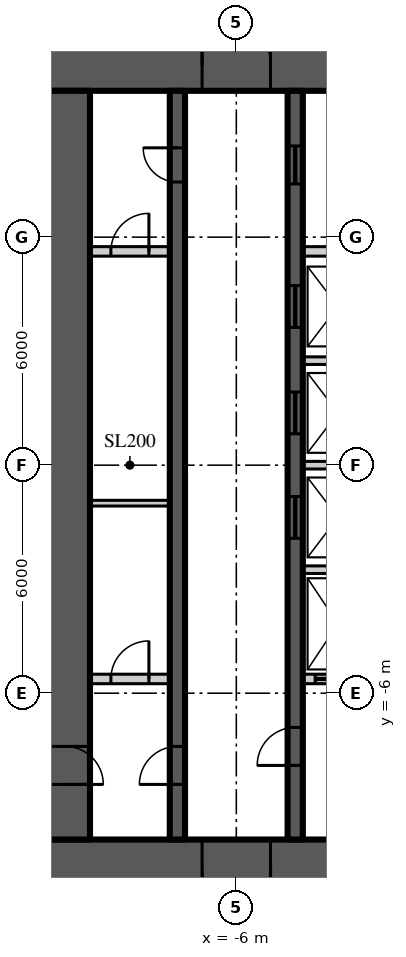
"""IFC4 building model, lengths in metres.
Left out: names, types, materials, properties, quantities, classifications, styles, units other than length and angle.
Written with IfcOpenShell. Run it as: python <this file> out.ifc"""

import sys

from ifc_helpers import new_model, si_unit, direction, frame, frame_2d, origin, place, context, subcontext, project, spatial, rectangle, extrude, element, fill, save


model = new_model("IFC4")
c1 = context("Model", 3, precision=1e-05, world=origin(), true_north=direction((0.0, 1.0)))
c2 = subcontext(c1, "Body", "Model", "MODEL_VIEW")
j1 = project(units=[si_unit("LENGTHUNIT", "METRE"), si_unit("PLANEANGLEUNIT", "RADIAN")], contexts=[c1])
p1 = place(None, origin())
s1 = spatial("IfcSite", under=j1, at=p1, CompositionType="ELEMENT")
p2 = place(p1, origin())
s2 = spatial("IfcBuilding", under=s1, at=p2, CompositionType="ELEMENT")
p3 = place(p2, frame((0.0, 0.0, 143.7)))
s3 = spatial("IfcBuildingStorey", under=s2, at=p3, CompositionType="ELEMENT", Elevation=143.7)
p4 = place(p3, frame((-11.15, 10.5, 0.0), z_axis=(0.0, 0.0, 1.0), x_axis=(1.0, 0.0, 0.0)))
e1 = element("IfcWall", 1, at=p4, inside=s3, PredefinedType="SHEAR", context=c2, shape_type="SweptSolid", body=[
    extrude(rectangle(XDim=22.3, YDim=1.3, at=frame_2d((11.15, 0.0))), origin(), (0.0, 0.0, 1.0), 3.9),
])
p5 = place(p4, frame((4.25, 0.0, 0.0)))
e2 = element("IfcOpeningElement", 2, at=p5, cuts=e1, PredefinedType="OPENING", context=c2, shape_type="SweptSolid", body=[
    extrude(rectangle(XDim=1.8, YDim=2.2, at=frame_2d((0.9, 1.1))), frame((0.0, 0.66, 0.0), z_axis=(0.0, -1.0, 0.0), x_axis=(1.0, 0.0, 0.0)), (0.0, 0.0, 1.0), 1.32),
])
p6 = place(p4, frame((16.25, 0.0, 0.0)))
e3 = element("IfcOpeningElement", 3, at=p6, cuts=e1, PredefinedType="OPENING", context=c2, shape_type="SweptSolid", body=[
    extrude(rectangle(XDim=1.8, YDim=2.2, at=frame_2d((0.9, 1.1))), frame((0.0, 0.66, 0.0), z_axis=(0.0, -1.0, 0.0), x_axis=(1.0, 0.0, 0.0)), (0.0, 0.0, 1.0), 1.32),
])
p7 = place(p3, frame((11.15, -10.5, 0.0), z_axis=(0.0, 0.0, 1.0), x_axis=(-1.0, 0.0, 0.0)))
e4 = element("IfcWall", 4, at=p7, inside=s3, PredefinedType="SHEAR", context=c2, shape_type="SweptSolid", body=[
    extrude(rectangle(XDim=22.3, YDim=1.3, at=frame_2d((11.15, 0.0))), origin(), (0.0, 0.0, 1.0), 3.9),
])
p8 = place(p7, frame((16.25, 0.0, 0.0)))
e5 = element("IfcOpeningElement", 5, at=p8, cuts=e4, PredefinedType="OPENING", context=c2, shape_type="SweptSolid", body=[
    extrude(rectangle(XDim=1.8, YDim=2.2, at=frame_2d((0.9, 1.1))), frame((0.0, 0.66, 0.0), z_axis=(0.0, -1.0, 0.0), x_axis=(1.0, 0.0, 0.0)), (0.0, 0.0, 1.0), 1.32),
])
p9 = place(p7, frame((4.25, 0.0, 0.0)))
e6 = element("IfcOpeningElement", 6, at=p9, cuts=e4, PredefinedType="OPENING", context=c2, shape_type="SweptSolid", body=[
    extrude(rectangle(XDim=1.8, YDim=2.2, at=frame_2d((0.9, 1.1))), frame((0.0, 0.66, 0.0), z_axis=(0.0, -1.0, 0.0), x_axis=(1.0, 0.0, 0.0)), (0.0, 0.0, 1.0), 1.32),
])
p10 = place(p3, frame((-10.5, 9.85, 0.0), z_axis=(0.0, 0.0, 1.0), x_axis=(0.0, -1.0, 0.0)))
e7 = element("IfcWall", 7, at=p10, inside=s3, PredefinedType="SHEAR", context=c2, shape_type="SweptSolid", body=[
    extrude(rectangle(XDim=19.7, YDim=1.3, at=frame_2d((9.85, 0.0))), origin(), (0.0, 0.0, 1.0), 3.9),
])
p11 = place(p10, frame((17.25, 0.0, 0.0)))
e8 = element("IfcOpeningElement", 8, at=p11, cuts=e7, PredefinedType="OPENING", context=c2, shape_type="SweptSolid", body=[
    extrude(rectangle(XDim=1.0, YDim=2.2, at=frame_2d((0.5, 1.1))), frame((0.0, 0.66, 0.0), z_axis=(0.0, -1.0, 0.0), x_axis=(1.0, 0.0, 0.0)), (0.0, 0.0, 1.0), 1.32),
])
p12 = place(p3, frame((-7.55, -9.85, 0.0), z_axis=(0.0, 0.0, 1.0), x_axis=(0.0, 1.0, 0.0)))
e9 = element("IfcWall", 9, at=p12, inside=s3, PredefinedType="SHEAR", context=c2, shape_type="SweptSolid", body=[
    extrude(rectangle(XDim=19.7, YDim=0.4, at=frame_2d((9.85, 0.0))), origin(), (0.0, 0.0, 1.0), 3.9),
])
p13 = place(p12, frame((1.45, 0.0, 0.0)))
e10 = element("IfcOpeningElement", 10, at=p13, cuts=e9, PredefinedType="OPENING", context=c2, shape_type="SweptSolid", body=[
    extrude(rectangle(XDim=1.0, YDim=2.2, at=frame_2d((0.5, 1.1))), frame((0.0, 0.21, 0.0), z_axis=(0.0, -1.0, 0.0), x_axis=(1.0, 0.0, 0.0)), (0.0, 0.0, 1.0), 0.42),
])
p14 = place(p12, frame((17.3, 0.0, 0.0)))
e11 = element("IfcOpeningElement", 11, at=p14, cuts=e9, PredefinedType="OPENING", context=c2, shape_type="SweptSolid", body=[
    extrude(rectangle(XDim=0.9, YDim=2.1, at=frame_2d((0.45, 1.05))), frame((0.0, 0.21, 0.0), z_axis=(0.0, -1.0, 0.0), x_axis=(1.0, 0.0, 0.0)), (0.0, 0.0, 1.0), 0.42),
])
p15 = place(p3, frame((-4.45, -9.85, 0.0), z_axis=(0.0, 0.0, 1.0), x_axis=(0.0, 1.0, 0.0)))
e12 = element("IfcWall", 12, at=p15, inside=s3, PredefinedType="SHEAR", context=c2, shape_type="SweptSolid", body=[
    extrude(rectangle(XDim=19.7, YDim=0.4, at=frame_2d((9.85, 0.0))), origin(), (0.0, 0.0, 1.0), 3.9),
])
p16 = place(p15, frame((1.95, 0.0, 0.0)))
e13 = element("IfcOpeningElement", 13, at=p16, cuts=e12, PredefinedType="OPENING", context=c2, shape_type="SweptSolid", body=[
    extrude(rectangle(XDim=1.0, YDim=2.2, at=frame_2d((0.5, 1.1))), frame((0.0, 0.21, 0.0), z_axis=(0.0, -1.0, 0.0), x_axis=(1.0, 0.0, 0.0)), (0.0, 0.0, 1.0), 0.42),
])
p17 = place(p15, frame((17.25, 0.0, 0.0)))
e14 = element("IfcOpeningElement", 14, at=p17, cuts=e12, PredefinedType="OPENING", context=c2, shape_type="SweptSolid", body=[
    extrude(rectangle(XDim=1.0, YDim=2.1, at=frame_2d((0.5, 1.05))), frame((0.0, 0.21, 0.0), z_axis=(0.0, -1.0, 0.0), x_axis=(1.0, 0.0, 0.0)), (0.0, 0.0, 1.0), 0.42),
])
p18 = place(p15, frame((7.925, 0.0, 0.0)))
e15 = element("IfcOpeningElement", 15, at=p18, cuts=e12, PredefinedType="OPENING", context=c2, shape_type="SweptSolid", body=[
    extrude(rectangle(XDim=1.1, YDim=2.2, at=frame_2d((0.55, 1.1))), frame((0.0, 0.21, 0.0), z_axis=(0.0, -1.0, 0.0), x_axis=(1.0, 0.0, 0.0)), (0.0, 0.0, 1.0), 0.42),
])
p19 = place(p15, frame((10.675, 0.0, 0.0)))
e16 = element("IfcOpeningElement", 16, at=p19, cuts=e12, PredefinedType="OPENING", context=c2, shape_type="SweptSolid", body=[
    extrude(rectangle(XDim=1.1, YDim=2.2, at=frame_2d((0.55, 1.1))), frame((0.0, 0.21, 0.0), z_axis=(0.0, -1.0, 0.0), x_axis=(1.0, 0.0, 0.0)), (0.0, 0.0, 1.0), 0.42),
])
p20 = place(p15, frame((13.475, 0.0, 0.0)))
e17 = element("IfcOpeningElement", 17, at=p20, cuts=e12, PredefinedType="OPENING", context=c2, shape_type="SweptSolid", body=[
    extrude(rectangle(XDim=1.1, YDim=2.2, at=frame_2d((0.55, 1.1))), frame((0.0, 0.21, 0.0), z_axis=(0.0, -1.0, 0.0), x_axis=(1.0, 0.0, 0.0)), (0.0, 0.0, 1.0), 0.42),
])
p21 = place(p3, frame((-9.85, 5.625, 0.0), z_axis=(0.0, 0.0, 1.0), x_axis=(1.0, 0.0, 0.0)))
e18 = element("IfcWall", 18, at=p21, inside=s3, PredefinedType="SOLIDWALL", context=c2, shape_type="SweptSolid", body=[
    extrude(rectangle(XDim=2.1, YDim=0.25, at=frame_2d((1.05, 0.0))), origin(), (0.0, 0.0, 1.0), 3.7),
])
p22 = place(p21, frame((0.55, 0.0, 0.0)))
e19 = element("IfcOpeningElement", 19, at=p22, cuts=e18, PredefinedType="OPENING", context=c2, shape_type="SweptSolid", body=[
    extrude(rectangle(XDim=1.0, YDim=2.2, at=frame_2d((0.5, 1.1))), frame((0.0, 0.135, 0.0), z_axis=(0.0, -1.0, 0.0), x_axis=(1.0, 0.0, 0.0)), (0.0, 0.0, 1.0), 0.27),
])
p23 = place(p3, frame((-4.25, 5.625, 0.0), z_axis=(0.0, 0.0, 1.0), x_axis=(1.0, 0.0, 0.0)))
e20 = element("IfcWall", 20, at=p23, inside=s3, PredefinedType="SOLIDWALL", context=c2, shape_type="SweptSolid", body=[
    extrude(rectangle(XDim=1.85, YDim=0.25, at=frame_2d((0.925, 0.0))), origin(), (0.0, 0.0, 1.0), 3.7),
])
p24 = place(p3, frame((-9.85, -5.625, 0.0), z_axis=(0.0, 0.0, 1.0), x_axis=(1.0, 0.0, 0.0)))
e21 = element("IfcWall", 21, at=p24, inside=s3, PredefinedType="SOLIDWALL", context=c2, shape_type="SweptSolid", body=[
    extrude(rectangle(XDim=2.1, YDim=0.25, at=frame_2d((1.05, 0.0))), origin(), (0.0, 0.0, 1.0), 3.7),
])
p25 = place(p24, frame((0.55, 0.0, 0.0)))
e22 = element("IfcOpeningElement", 22, at=p25, cuts=e21, PredefinedType="OPENING", context=c2, shape_type="SweptSolid", body=[
    extrude(rectangle(XDim=1.0, YDim=2.2, at=frame_2d((0.5, 1.1))), frame((0.0, 0.135, 0.0), z_axis=(0.0, -1.0, 0.0), x_axis=(1.0, 0.0, 0.0)), (0.0, 0.0, 1.0), 0.27),
])
p26 = place(p3, frame((-4.25, -5.625, 0.0), z_axis=(0.0, 0.0, 1.0), x_axis=(1.0, 0.0, 0.0)))
e23 = element("IfcWall", 23, at=p26, inside=s3, PredefinedType="SOLIDWALL", context=c2, shape_type="SweptSolid", body=[
    extrude(rectangle(XDim=1.85, YDim=0.25, at=frame_2d((0.925, 0.0))), origin(), (0.0, 0.0, 1.0), 3.7),
])
p27 = place(p26, frame((0.325, 0.0, 0.0)))
e24 = element("IfcOpeningElement", 24, at=p27, cuts=e23, PredefinedType="OPENING", context=c2, shape_type="SweptSolid", body=[
    extrude(rectangle(XDim=1.2, YDim=2.2, at=frame_2d((0.6, 1.1))), frame((0.0, 0.135, 0.0), z_axis=(0.0, -1.0, 0.0), x_axis=(1.0, 0.0, 0.0)), (0.0, 0.0, 1.0), 0.27),
])
for number, where, z_axis, x_axis in (
    (25, (-4.25, -2.75, 0.0), (0.0, 0.0, 1.0), (1.0, 0.0, 0.0)),
    (26, (-4.25, 0.0, 0.0), (0.0, 0.0, 1.0), (1.0, 0.0, 0.0)),
    (27, (-4.25, 2.75, 0.0), (0.0, 0.0, 1.0), (1.0, 0.0, 0.0)),
):
    element("IfcWall", number, at=place(p3, frame(where, z_axis=z_axis, x_axis=x_axis)), inside=s3, PredefinedType="SOLIDWALL", context=c2, shape_type="SweptSolid", body=[
        extrude(rectangle(XDim=1.85, YDim=0.2, at=frame_2d((0.925, 0.0))), origin(), (0.0, 0.0, 1.0), 3.7),
    ])
p28 = place(p3, frame((-9.85, -1.0, 0.0), z_axis=(0.0, 0.0, 1.0), x_axis=(1.0, 0.0, 0.0)))
e28 = element("IfcWall", 28, at=p28, inside=s3, PredefinedType="SOLIDWALL", context=c2, shape_type="SweptSolid", body=[
    extrude(rectangle(XDim=2.1, YDim=0.15, at=frame_2d((1.05, 0.0))), origin(), (0.0, 0.0, 1.0), 3.77),
])
p29 = place(p5, origin())
e29 = element("IfcDoor", 29, at=p29, inside=s3, OperationType="DOUBLE_DOOR_DOUBLE_SWING", PredefinedType="DOOR", context=c2, shape_type="SweptSolid", body=[
    extrude(rectangle(XDim=1.8, YDim=2.2, at=frame_2d((0.9, 1.1))), frame((0.0, 0.025, 0.0), z_axis=(0.0, -1.0, 0.0), x_axis=(1.0, 0.0, 0.0)), (0.0, 0.0, 1.0), 0.05),
])
fill(e2, e29)
p30 = place(p8, origin())
e30 = element("IfcDoor", 30, at=p30, inside=s3, OperationType="DOUBLE_DOOR_DOUBLE_SWING", PredefinedType="DOOR", context=c2, shape_type="SweptSolid", body=[
    extrude(rectangle(XDim=1.8, YDim=2.2, at=frame_2d((0.9, 1.1))), frame((0.0, 0.025, 0.0), z_axis=(0.0, -1.0, 0.0), x_axis=(1.0, 0.0, 0.0)), (0.0, 0.0, 1.0), 0.05),
])
fill(e5, e30)
p31 = place(p13, origin())
e31 = element("IfcDoor", 31, at=p31, inside=s3, OperationType="SINGLE_SWING_LEFT", PredefinedType="DOOR", context=c2, shape_type="SweptSolid", body=[
    extrude(rectangle(XDim=1.0, YDim=2.2, at=frame_2d((0.5, 1.1))), frame((0.0, 0.025, 0.0), z_axis=(0.0, -1.0, 0.0), x_axis=(1.0, 0.0, 0.0)), (0.0, 0.0, 1.0), 0.05),
])
fill(e10, e31)
p32 = place(p11, origin())
e32 = element("IfcDoor", 32, at=p32, inside=s3, OperationType="SINGLE_SWING_RIGHT", PredefinedType="DOOR", context=c2, shape_type="SweptSolid", body=[
    extrude(rectangle(XDim=1.0, YDim=2.2, at=frame_2d((0.5, 1.1))), frame((0.0, 0.025, 0.0), z_axis=(0.0, -1.0, 0.0), x_axis=(1.0, 0.0, 0.0)), (0.0, 0.0, 1.0), 0.05),
])
fill(e8, e32)
p33 = place(p16, origin())
e33 = element("IfcDoor", 33, at=p33, inside=s3, OperationType="SINGLE_SWING_LEFT", PredefinedType="DOOR", context=c2, shape_type="SweptSolid", body=[
    extrude(rectangle(XDim=1.0, YDim=2.2, at=frame_2d((0.5, 1.1))), frame((0.0, 0.025, 0.0), z_axis=(0.0, -1.0, 0.0), x_axis=(1.0, 0.0, 0.0)), (0.0, 0.0, 1.0), 0.05),
])
fill(e13, e33)
p34 = place(p14, origin())
e34 = element("IfcDoor", 34, at=p34, inside=s3, OperationType="SINGLE_SWING_RIGHT", PredefinedType="DOOR", context=c2, shape_type="SweptSolid", body=[
    extrude(rectangle(XDim=0.9, YDim=2.1, at=frame_2d((0.45, 1.05))), frame((0.0, 0.025, 0.0), z_axis=(0.0, -1.0, 0.0), x_axis=(1.0, 0.0, 0.0)), (0.0, 0.0, 1.0), 0.05),
])
fill(e11, e34)
p35 = place(p17, origin())
e35 = element("IfcDoor", 35, at=p35, inside=s3, OperationType="SLIDING_TO_LEFT", PredefinedType="DOOR", context=c2, shape_type="SweptSolid", body=[
    extrude(rectangle(XDim=1.0, YDim=2.1, at=frame_2d((0.5, 1.05))), frame((0.0, 0.025, 0.0), z_axis=(0.0, -1.0, 0.0), x_axis=(1.0, 0.0, 0.0)), (0.0, 0.0, 1.0), 0.05),
])
fill(e14, e35)
p36 = place(p18, origin())
e36 = element("IfcDoor", 36, at=p36, inside=s3, OperationType="SLIDING_TO_LEFT", PredefinedType="DOOR", context=c2, shape_type="SweptSolid", body=[
    extrude(rectangle(XDim=1.1, YDim=2.2, at=frame_2d((0.55, 1.1))), frame((0.0, 0.025, 0.0), z_axis=(0.0, -1.0, 0.0), x_axis=(1.0, 0.0, 0.0)), (0.0, 0.0, 1.0), 0.05),
])
fill(e15, e36)
p37 = place(p19, origin())
e37 = element("IfcDoor", 37, at=p37, inside=s3, OperationType="SLIDING_TO_LEFT", PredefinedType="DOOR", context=c2, shape_type="SweptSolid", body=[
    extrude(rectangle(XDim=1.1, YDim=2.2, at=frame_2d((0.55, 1.1))), frame((0.0, 0.025, 0.0), z_axis=(0.0, -1.0, 0.0), x_axis=(1.0, 0.0, 0.0)), (0.0, 0.0, 1.0), 0.05),
])
fill(e16, e37)
p38 = place(p20, origin())
e38 = element("IfcDoor", 38, at=p38, inside=s3, OperationType="SLIDING_TO_LEFT", PredefinedType="DOOR", context=c2, shape_type="SweptSolid", body=[
    extrude(rectangle(XDim=1.1, YDim=2.2, at=frame_2d((0.55, 1.1))), frame((0.0, 0.025, 0.0), z_axis=(0.0, -1.0, 0.0), x_axis=(1.0, 0.0, 0.0)), (0.0, 0.0, 1.0), 0.05),
])
fill(e17, e38)
p39 = place(p27, origin())
e39 = element("IfcDoor", 39, at=p39, inside=s3, OperationType="SLIDING_TO_LEFT", PredefinedType="DOOR", context=c2, shape_type="SweptSolid", body=[
    extrude(rectangle(XDim=1.2, YDim=2.2, at=frame_2d((0.6, 1.1))), frame((0.0, 0.025, 0.0), z_axis=(0.0, -1.0, 0.0), x_axis=(1.0, 0.0, 0.0)), (0.0, 0.0, 1.0), 0.05),
])
fill(e24, e39)
p40 = place(p22, origin())
e40 = element("IfcDoor", 40, at=p40, inside=s3, OperationType="SINGLE_SWING_RIGHT", PredefinedType="DOOR", context=c2, shape_type="SweptSolid", body=[
    extrude(rectangle(XDim=1.0, YDim=2.2, at=frame_2d((0.5, 1.1))), frame((0.0, 0.025, 0.0), z_axis=(0.0, -1.0, 0.0), x_axis=(1.0, 0.0, 0.0)), (0.0, 0.0, 1.0), 0.05),
])
fill(e19, e40)
p41 = place(p25, origin())
e41 = element("IfcDoor", 41, at=p41, inside=s3, OperationType="SINGLE_SWING_RIGHT", PredefinedType="DOOR", context=c2, shape_type="SweptSolid", body=[
    extrude(rectangle(XDim=1.0, YDim=2.2, at=frame_2d((0.5, 1.1))), frame((0.0, 0.025, 0.0), z_axis=(0.0, -1.0, 0.0), x_axis=(1.0, 0.0, 0.0)), (0.0, 0.0, 1.0), 0.05),
])
fill(e22, e41)
save(model, sys.argv[1])
